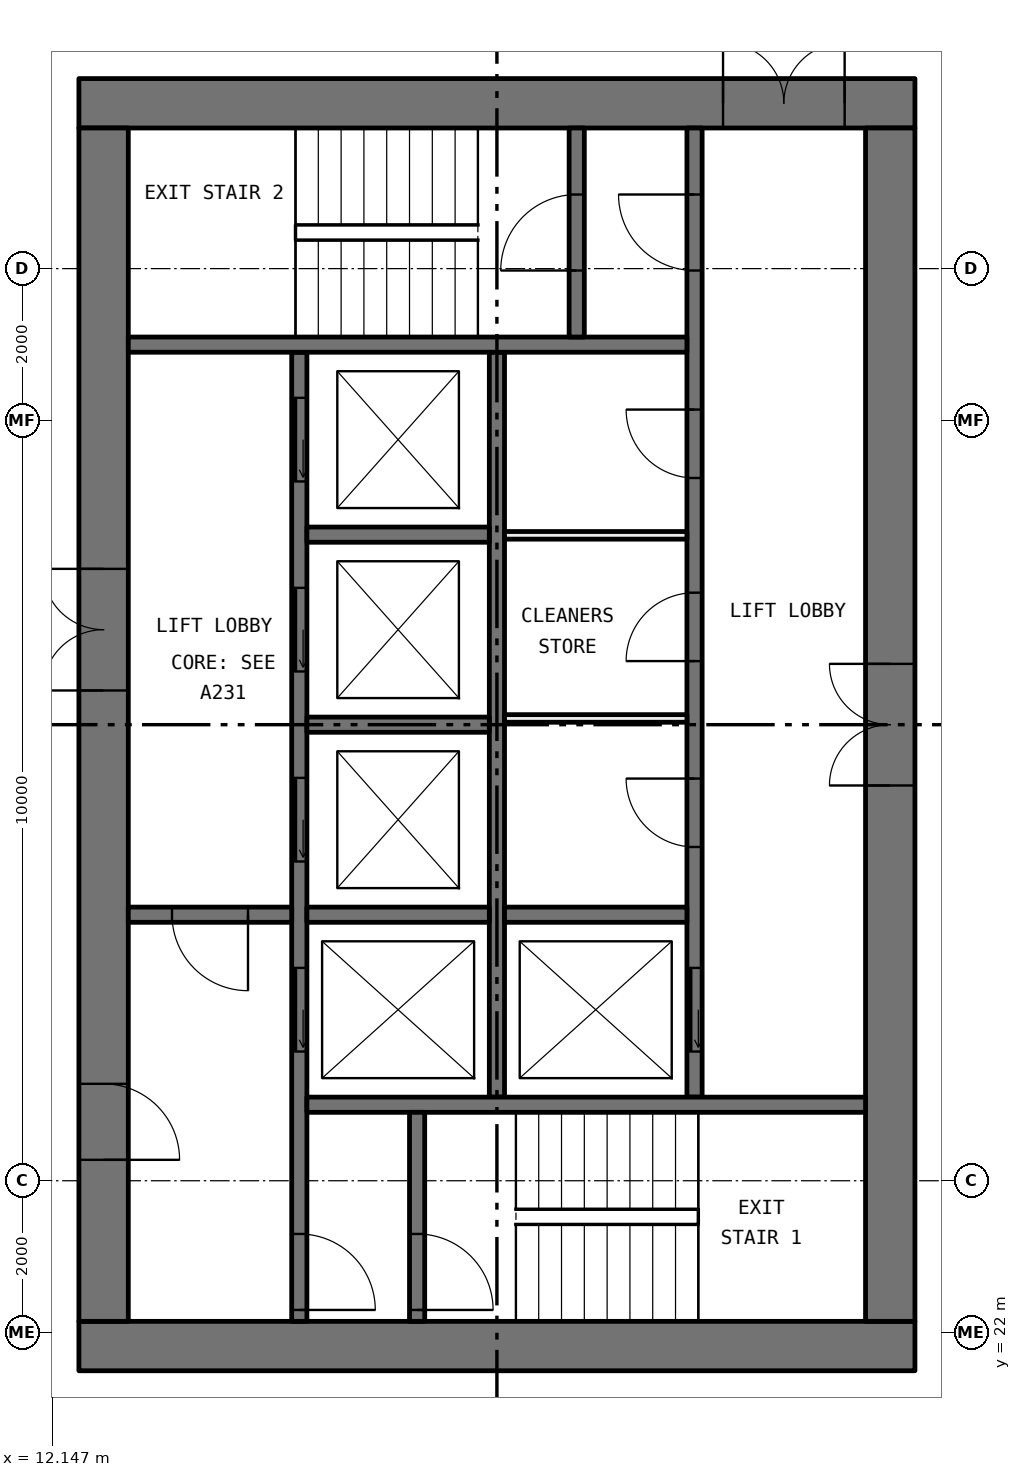
"""IFC4 building model, lengths in metres.
Left out: names, types, materials, properties, quantities, classifications, styles, units other than length and angle.
Written with IfcOpenShell. Run it as: python <this file> out.ifc"""

import sys

from ifc_helpers import new_model, si_unit, direction, frame, frame_2d, origin, place, context, subcontext, project, spatial, rectangle, extrude, element, fill, save


model = new_model("IFC4")
c1 = context("Model", 3, precision=1e-05, world=origin(), true_north=direction((0.0, 1.0)))
c2 = subcontext(c1, "Body", "Model", "MODEL_VIEW")
j1 = project(units=[si_unit("LENGTHUNIT", "METRE"), si_unit("PLANEANGLEUNIT", "RADIAN")], contexts=[c1])
p1 = place(None, origin())
s1 = spatial("IfcSite", under=j1, at=p1, CompositionType="ELEMENT")
p2 = place(p1, origin())
s2 = spatial("IfcBuilding", under=s1, at=p2, CompositionType="ELEMENT")
p3 = place(p2, frame((0.0, 0.0, 117.3)))
s3 = spatial("IfcBuildingStorey", under=s2, at=p3, CompositionType="ELEMENT", Elevation=117.3)
p4 = place(p3, frame((12.5, 21.825, 0.0), z_axis=(0.0, 0.0, 1.0), x_axis=(1.0, 0.0, 0.0)))
e1 = element("IfcWall", 1, at=p4, inside=s3, PredefinedType="SHEAR", context=c2, shape_type="SweptSolid", body=[
    extrude(rectangle(XDim=11.0, YDim=0.65, at=frame_2d((5.5, 0.0))), origin(), (0.0, 0.0, 1.0), 3.05),
])
p5 = place(p3, frame((12.5, 38.175, 0.0), z_axis=(0.0, 0.0, 1.0), x_axis=(1.0, 0.0, 0.0)))
e2 = element("IfcWall", 2, at=p5, inside=s3, PredefinedType="SHEAR", context=c2, shape_type="SweptSolid", body=[
    extrude(rectangle(XDim=11.0, YDim=0.65, at=frame_2d((5.5, 0.0))), origin(), (0.0, 0.0, 1.0), 3.05),
])
p6 = place(p5, frame((8.475, 0.0, 0.0)))
e3 = element("IfcOpeningElement", 3, at=p6, cuts=e2, PredefinedType="OPENING", context=c2, shape_type="SweptSolid", body=[
    extrude(rectangle(XDim=1.6, YDim=2.1, at=frame_2d((0.8, 1.05))), frame((0.0, 0.335, 0.0), z_axis=(0.0, -1.0, 0.0), x_axis=(1.0, 0.0, 0.0)), (0.0, 0.0, 1.0), 0.67),
])
p7 = place(p3, frame((12.825, 22.15, 0.0), z_axis=(0.0, 0.0, 1.0), x_axis=(0.0, 1.0, 0.0)))
e4 = element("IfcWall", 4, at=p7, inside=s3, PredefinedType="SHEAR", context=c2, shape_type="SweptSolid", body=[
    extrude(rectangle(XDim=15.7, YDim=0.65, at=frame_2d((7.85, 0.0))), origin(), (0.0, 0.0, 1.0), 3.05),
])
p8 = place(p7, frame((8.3, 0.0, 0.0)))
e5 = element("IfcOpeningElement", 5, at=p8, cuts=e4, PredefinedType="OPENING", context=c2, shape_type="SweptSolid", body=[
    extrude(rectangle(XDim=1.6, YDim=2.1, at=frame_2d((0.8, 1.05))), frame((0.0, 0.335, 0.0), z_axis=(0.0, -1.0, 0.0), x_axis=(1.0, 0.0, 0.0)), (0.0, 0.0, 1.0), 0.67),
])
p9 = place(p7, frame((2.125, 0.0, 0.0)))
e6 = element("IfcOpeningElement", 6, at=p9, cuts=e4, PredefinedType="OPENING", context=c2, shape_type="SweptSolid", body=[
    extrude(rectangle(XDim=1.0, YDim=2.1, at=frame_2d((0.5, 1.05))), frame((0.0, 0.335, 0.0), z_axis=(0.0, -1.0, 0.0), x_axis=(1.0, 0.0, 0.0)), (0.0, 0.0, 1.0), 0.67),
])
p10 = place(p3, frame((23.175, 22.15, 0.0), z_axis=(0.0, 0.0, 1.0), x_axis=(0.0, 1.0, 0.0)))
e7 = element("IfcWall", 7, at=p10, inside=s3, PredefinedType="SHEAR", context=c2, shape_type="SweptSolid", body=[
    extrude(rectangle(XDim=15.7, YDim=0.65, at=frame_2d((7.85, 0.0))), origin(), (0.0, 0.0, 1.0), 3.05),
])
p11 = place(p10, frame((7.05, 0.0, 0.0)))
e8 = element("IfcOpeningElement", 8, at=p11, cuts=e7, PredefinedType="OPENING", context=c2, shape_type="SweptSolid", body=[
    extrude(rectangle(XDim=1.6, YDim=2.1, at=frame_2d((0.8, 1.05))), frame((0.0, 0.335, 0.0), z_axis=(0.0, -1.0, 0.0), x_axis=(1.0, 0.0, 0.0)), (0.0, 0.0, 1.0), 0.67),
])
p12 = place(p3, frame((15.4, 22.15, 0.0), z_axis=(0.0, 0.0, 1.0), x_axis=(0.0, 1.0, 0.0)))
e9 = element("IfcWall", 9, at=p12, inside=s3, PredefinedType="SOLIDWALL", context=c2, shape_type="SweptSolid", body=[
    extrude(rectangle(XDim=12.75, YDim=0.2, at=frame_2d((6.375, 0.0))), origin(), (0.0, 0.0, 1.0), 3.05),
])
p13 = place(p12, frame((3.55, 0.0, 0.0)))
e10 = element("IfcOpeningElement", 10, at=p13, cuts=e9, PredefinedType="OPENING", context=c2, shape_type="SweptSolid", body=[
    extrude(rectangle(XDim=1.1, YDim=2.1, at=frame_2d((0.55, 1.05))), frame((0.0, 0.11, 0.0), z_axis=(0.0, -1.0, 0.0), x_axis=(1.0, 0.0, 0.0)), (0.0, 0.0, 1.0), 0.22),
])
p14 = place(p12, frame((6.05, 0.0, 0.0)))
e11 = element("IfcOpeningElement", 11, at=p14, cuts=e9, PredefinedType="OPENING", context=c2, shape_type="SweptSolid", body=[
    extrude(rectangle(XDim=1.1, YDim=2.1, at=frame_2d((0.55, 1.05))), frame((0.0, 0.11, 0.0), z_axis=(0.0, -1.0, 0.0), x_axis=(1.0, 0.0, 0.0)), (0.0, 0.0, 1.0), 0.22),
])
p15 = place(p12, frame((8.55, 0.0, 0.0)))
e12 = element("IfcOpeningElement", 12, at=p15, cuts=e9, PredefinedType="OPENING", context=c2, shape_type="SweptSolid", body=[
    extrude(rectangle(XDim=1.1, YDim=2.1, at=frame_2d((0.55, 1.05))), frame((0.0, 0.11, 0.0), z_axis=(0.0, -1.0, 0.0), x_axis=(1.0, 0.0, 0.0)), (0.0, 0.0, 1.0), 0.22),
])
p16 = place(p12, frame((11.05, 0.0, 0.0)))
e13 = element("IfcOpeningElement", 13, at=p16, cuts=e9, PredefinedType="OPENING", context=c2, shape_type="SweptSolid", body=[
    extrude(rectangle(XDim=1.1, YDim=2.1, at=frame_2d((0.55, 1.05))), frame((0.0, 0.11, 0.0), z_axis=(0.0, -1.0, 0.0), x_axis=(1.0, 0.0, 0.0)), (0.0, 0.0, 1.0), 0.22),
])
p17 = place(p12, frame((0.15, 0.0, 0.0)))
e14 = element("IfcOpeningElement", 14, at=p17, cuts=e9, PredefinedType="OPENING", context=c2, shape_type="SweptSolid", body=[
    extrude(rectangle(XDim=1.0, YDim=2.1, at=frame_2d((0.5, 1.05))), frame((0.0, 0.11, 0.0), z_axis=(0.0, -1.0, 0.0), x_axis=(1.0, 0.0, 0.0)), (0.0, 0.0, 1.0), 0.22),
])
p18 = place(p3, frame((20.6, 25.1, 0.0), z_axis=(0.0, 0.0, 1.0), x_axis=(0.0, 1.0, 0.0)))
e15 = element("IfcWall", 15, at=p18, inside=s3, PredefinedType="SOLIDWALL", context=c2, shape_type="SweptSolid", body=[
    extrude(rectangle(XDim=12.75, YDim=0.2, at=frame_2d((6.375, 0.0))), origin(), (0.0, 0.0, 1.0), 3.05),
])
p19 = place(p18, frame((0.6, 0.0, 0.0)))
e16 = element("IfcOpeningElement", 16, at=p19, cuts=e15, PredefinedType="OPENING", context=c2, shape_type="SweptSolid", body=[
    extrude(rectangle(XDim=1.1, YDim=2.1, at=frame_2d((0.55, 1.05))), frame((0.0, 0.11, 0.0), z_axis=(0.0, -1.0, 0.0), x_axis=(1.0, 0.0, 0.0)), (0.0, 0.0, 1.0), 0.22),
])
p20 = place(p18, frame((10.875, 0.0, 0.0)))
e17 = element("IfcOpeningElement", 17, at=p20, cuts=e15, PredefinedType="OPENING", context=c2, shape_type="SweptSolid", body=[
    extrude(rectangle(XDim=1.0, YDim=2.1, at=frame_2d((0.5, 1.05))), frame((0.0, 0.11, 0.0), z_axis=(0.0, -1.0, 0.0), x_axis=(1.0, 0.0, 0.0)), (0.0, 0.0, 1.0), 0.22),
])
p21 = place(p18, frame((3.291, 0.0, 0.0)))
e18 = element("IfcOpeningElement", 18, at=p21, cuts=e15, PredefinedType="OPENING", context=c2, shape_type="SweptSolid", body=[
    extrude(rectangle(XDim=0.9, YDim=2.1, at=frame_2d((0.45, 1.05))), frame((0.0, 0.11, 0.0), z_axis=(0.0, -1.0, 0.0), x_axis=(1.0, 0.0, 0.0)), (0.0, 0.0, 1.0), 0.22),
])
p22 = place(p18, frame((5.737, 0.0, 0.0)))
e19 = element("IfcOpeningElement", 19, at=p22, cuts=e15, PredefinedType="OPENING", context=c2, shape_type="SweptSolid", body=[
    extrude(rectangle(XDim=0.9, YDim=2.1, at=frame_2d((0.45, 1.05))), frame((0.0, 0.11, 0.0), z_axis=(0.0, -1.0, 0.0), x_axis=(1.0, 0.0, 0.0)), (0.0, 0.0, 1.0), 0.22),
])
p23 = place(p18, frame((8.146, 0.0, 0.0)))
e20 = element("IfcOpeningElement", 20, at=p23, cuts=e15, PredefinedType="OPENING", context=c2, shape_type="SweptSolid", body=[
    extrude(rectangle(XDim=0.9, YDim=2.1, at=frame_2d((0.45, 1.05))), frame((0.0, 0.11, 0.0), z_axis=(0.0, -1.0, 0.0), x_axis=(1.0, 0.0, 0.0)), (0.0, 0.0, 1.0), 0.22),
])
p24 = place(p3, frame((18.0, 25.1, 0.0), z_axis=(0.0, 0.0, 1.0), x_axis=(0.0, 1.0, 0.0)))
e21 = element("IfcWall", 21, at=p24, inside=s3, PredefinedType="SOLIDWALL", context=c2, shape_type="SweptSolid", body=[
    extrude(rectangle(XDim=9.8, YDim=0.2, at=frame_2d((4.9, 0.0))), origin(), (0.0, 0.0, 1.0), 3.05),
])
for number, where, z_axis, x_axis in (
    (22, (15.5, 25.0, 0.0), (0.0, 0.0, 1.0), (1.0, 0.0, 0.0)),
    (23, (13.15, 35.0, 0.0), (0.0, 0.0, 1.0), (1.0, 0.0, 0.0)),
):
    element("IfcWall", number, at=place(p3, frame(where, z_axis=z_axis, x_axis=x_axis)), inside=s3, PredefinedType="SOLIDWALL", context=c2, shape_type="SweptSolid", body=[
        extrude(rectangle(XDim=7.35, YDim=0.2, at=frame_2d((3.675, 0.0))), origin(), (0.0, 0.0, 1.0), 3.05),
    ])
p25 = place(p3, frame((13.15, 27.5, 0.0), z_axis=(0.0, 0.0, 1.0), x_axis=(1.0, 0.0, 0.0)))
e24 = element("IfcWall", 24, at=p25, inside=s3, PredefinedType="SOLIDWALL", context=c2, shape_type="SweptSolid", body=[
    extrude(rectangle(XDim=2.15, YDim=0.2, at=frame_2d((1.075, 0.0))), origin(), (0.0, 0.0, 1.0), 3.05),
])
p26 = place(p25, frame((0.575, 0.0, 0.0)))
e25 = element("IfcOpeningElement", 25, at=p26, cuts=e24, PredefinedType="OPENING", context=c2, shape_type="SweptSolid", body=[
    extrude(rectangle(XDim=1.0, YDim=2.1, at=frame_2d((0.5, 1.05))), frame((0.0, 0.11, 0.0), z_axis=(0.0, -1.0, 0.0), x_axis=(1.0, 0.0, 0.0)), (0.0, 0.0, 1.0), 0.22),
])
p27 = place(p3, frame((16.95, 22.15, 0.0), z_axis=(0.0, 0.0, 1.0), x_axis=(0.0, 1.0, 0.0)))
e26 = element("IfcWall", 26, at=p27, inside=s3, PredefinedType="SOLIDWALL", context=c2, shape_type="SweptSolid", body=[
    extrude(rectangle(XDim=2.75, YDim=0.2, at=frame_2d((1.375, 0.0))), origin(), (0.0, 0.0, 1.0), 3.05),
])
p28 = place(p27, frame((0.15, 0.0, 0.0)))
e27 = element("IfcOpeningElement", 27, at=p28, cuts=e26, PredefinedType="OPENING", context=c2, shape_type="SweptSolid", body=[
    extrude(rectangle(XDim=1.0, YDim=2.1, at=frame_2d((0.5, 1.05))), frame((0.0, 0.11, 0.0), z_axis=(0.0, -1.0, 0.0), x_axis=(1.0, 0.0, 0.0)), (0.0, 0.0, 1.0), 0.22),
])
p29 = place(p3, frame((19.05, 35.1, 0.0), z_axis=(0.0, 0.0, 1.0), x_axis=(0.0, 1.0, 0.0)))
e28 = element("IfcWall", 28, at=p29, inside=s3, PredefinedType="SOLIDWALL", context=c2, shape_type="SweptSolid", body=[
    extrude(rectangle(XDim=2.75, YDim=0.2, at=frame_2d((1.375, 0.0))), origin(), (0.0, 0.0, 1.0), 3.05),
])
p30 = place(p29, frame((0.875, 0.0, 0.0)))
e29 = element("IfcOpeningElement", 29, at=p30, cuts=e28, PredefinedType="OPENING", context=c2, shape_type="SweptSolid", body=[
    extrude(rectangle(XDim=1.0, YDim=2.1, at=frame_2d((0.5, 1.05))), frame((0.0, 0.11, 0.0), z_axis=(0.0, -1.0, 0.0), x_axis=(1.0, 0.0, 0.0)), (0.0, 0.0, 1.0), 0.22),
])
for number, where, z_axis, x_axis in (
    (30, (15.5, 27.5, 0.0), (0.0, 0.0, 1.0), (1.0, 0.0, 0.0)),
    (31, (15.5, 30.0, 0.0), (0.0, 0.0, 1.0), (1.0, 0.0, 0.0)),
    (32, (15.5, 32.5, 0.0), (0.0, 0.0, 1.0), (1.0, 0.0, 0.0)),
    (33, (18.1, 27.5, 0.0), (0.0, 0.0, 1.0), (1.0, 0.0, 0.0)),
):
    element("IfcWall", number, at=place(p3, frame(where, z_axis=z_axis, x_axis=x_axis)), inside=s3, PredefinedType="SOLIDWALL", context=c2, shape_type="SweptSolid", body=[
        extrude(rectangle(XDim=2.4, YDim=0.2, at=frame_2d((1.2, 0.0))), origin(), (0.0, 0.0, 1.0), 3.05),
    ])
for number, where, z_axis, x_axis in (
    (34, (18.1, 30.082, 0.0), (0.0, 0.0, 1.0), (1.0, 0.0, 0.0)),
    (35, (18.1, 32.491, 0.0), (0.0, 0.0, 1.0), (1.0, 0.0, 0.0)),
):
    element("IfcWall", number, at=place(p3, frame(where, z_axis=z_axis, x_axis=x_axis)), inside=s3, PredefinedType="PARTITIONING", context=c2, shape_type="SweptSolid", body=[
        extrude(rectangle(XDim=2.4, YDim=0.1, at=frame_2d((1.2, 0.0))), origin(), (0.0, 0.0, 1.0), 3.05),
    ])
p31 = place(p19, origin())
e36 = element("IfcDoor", 36, at=p31, inside=s3, OperationType="SLIDING_TO_LEFT", PredefinedType="DOOR", context=c2, shape_type="SweptSolid", body=[
    extrude(rectangle(XDim=1.1, YDim=2.1, at=frame_2d((0.55, 1.05))), frame((0.0, 0.025, 0.0), z_axis=(0.0, -1.0, 0.0), x_axis=(1.0, 0.0, 0.0)), (0.0, 0.0, 1.0), 0.05),
])
fill(e16, e36)
p32 = place(p13, origin())
e37 = element("IfcDoor", 37, at=p32, inside=s3, OperationType="SLIDING_TO_LEFT", PredefinedType="DOOR", context=c2, shape_type="SweptSolid", body=[
    extrude(rectangle(XDim=1.1, YDim=2.1, at=frame_2d((0.55, 1.05))), frame((0.0, 0.025, 0.0), z_axis=(0.0, -1.0, 0.0), x_axis=(1.0, 0.0, 0.0)), (0.0, 0.0, 1.0), 0.05),
])
fill(e10, e37)
p33 = place(p14, origin())
e38 = element("IfcDoor", 38, at=p33, inside=s3, OperationType="SLIDING_TO_LEFT", PredefinedType="DOOR", context=c2, shape_type="SweptSolid", body=[
    extrude(rectangle(XDim=1.1, YDim=2.1, at=frame_2d((0.55, 1.05))), frame((0.0, 0.025, 0.0), z_axis=(0.0, -1.0, 0.0), x_axis=(1.0, 0.0, 0.0)), (0.0, 0.0, 1.0), 0.05),
])
fill(e11, e38)
p34 = place(p15, origin())
e39 = element("IfcDoor", 39, at=p34, inside=s3, OperationType="SLIDING_TO_LEFT", PredefinedType="DOOR", context=c2, shape_type="SweptSolid", body=[
    extrude(rectangle(XDim=1.1, YDim=2.1, at=frame_2d((0.55, 1.05))), frame((0.0, 0.025, 0.0), z_axis=(0.0, -1.0, 0.0), x_axis=(1.0, 0.0, 0.0)), (0.0, 0.0, 1.0), 0.05),
])
fill(e12, e39)
p35 = place(p16, origin())
e40 = element("IfcDoor", 40, at=p35, inside=s3, OperationType="SLIDING_TO_LEFT", PredefinedType="DOOR", context=c2, shape_type="SweptSolid", body=[
    extrude(rectangle(XDim=1.1, YDim=2.1, at=frame_2d((0.55, 1.05))), frame((0.0, 0.025, 0.0), z_axis=(0.0, -1.0, 0.0), x_axis=(1.0, 0.0, 0.0)), (0.0, 0.0, 1.0), 0.05),
])
fill(e13, e40)
p36 = place(p28, frame((1.0, 0.0, 0.0), x_axis=(-1.0, 0.0, 0.0)))
e41 = element("IfcDoor", 41, at=p36, inside=s3, OperationType="SINGLE_SWING_LEFT", PredefinedType="DOOR", context=c2, shape_type="SweptSolid", body=[
    extrude(rectangle(XDim=1.0, YDim=2.1, at=frame_2d((0.5, 1.05))), frame((0.0, 0.025, 0.0), z_axis=(0.0, -1.0, 0.0), x_axis=(1.0, 0.0, 0.0)), (0.0, 0.0, 1.0), 0.05),
])
fill(e27, e41)
p37 = place(p17, frame((1.0, 0.0, 0.0), x_axis=(-1.0, 0.0, 0.0)))
e42 = element("IfcDoor", 42, at=p37, inside=s3, OperationType="SINGLE_SWING_LEFT", PredefinedType="DOOR", context=c2, shape_type="SweptSolid", body=[
    extrude(rectangle(XDim=1.0, YDim=2.1, at=frame_2d((0.5, 1.05))), frame((0.0, 0.025, 0.0), z_axis=(0.0, -1.0, 0.0), x_axis=(1.0, 0.0, 0.0)), (0.0, 0.0, 1.0), 0.05),
])
fill(e14, e42)
p38 = place(p20, origin())
e43 = element("IfcDoor", 43, at=p38, inside=s3, OperationType="SINGLE_SWING_LEFT", PredefinedType="DOOR", context=c2, shape_type="SweptSolid", body=[
    extrude(rectangle(XDim=1.0, YDim=2.1, at=frame_2d((0.5, 1.05))), frame((0.0, 0.025, 0.0), z_axis=(0.0, -1.0, 0.0), x_axis=(1.0, 0.0, 0.0)), (0.0, 0.0, 1.0), 0.05),
])
fill(e17, e43)
p39 = place(p30, origin())
e44 = element("IfcDoor", 44, at=p39, inside=s3, OperationType="SINGLE_SWING_RIGHT", PredefinedType="DOOR", context=c2, shape_type="SweptSolid", body=[
    extrude(rectangle(XDim=1.0, YDim=2.1, at=frame_2d((0.5, 1.05))), frame((0.0, 0.025, 0.0), z_axis=(0.0, -1.0, 0.0), x_axis=(1.0, 0.0, 0.0)), (0.0, 0.0, 1.0), 0.05),
])
fill(e29, e44)
p40 = place(p26, frame((1.0, 0.0, 0.0), x_axis=(-1.0, 0.0, 0.0)))
e45 = element("IfcDoor", 45, at=p40, inside=s3, OperationType="SINGLE_SWING_RIGHT", PredefinedType="DOOR", context=c2, shape_type="SweptSolid", body=[
    extrude(rectangle(XDim=1.0, YDim=2.1, at=frame_2d((0.5, 1.05))), frame((0.0, 0.025, 0.0), z_axis=(0.0, -1.0, 0.0), x_axis=(1.0, 0.0, 0.0)), (0.0, 0.0, 1.0), 0.05),
])
fill(e25, e45)
p41 = place(p8, origin())
e46 = element("IfcDoor", 46, at=p41, inside=s3, OperationType="DOUBLE_DOOR_SINGLE_SWING", PredefinedType="DOOR", context=c2, shape_type="SweptSolid", body=[
    extrude(rectangle(XDim=1.6, YDim=2.1, at=frame_2d((0.8, 1.05))), frame((0.0, 0.025, 0.0), z_axis=(0.0, -1.0, 0.0), x_axis=(1.0, 0.0, 0.0)), (0.0, 0.0, 1.0), 0.05),
])
fill(e5, e46)
p42 = place(p9, frame((1.0, 0.0, 0.0), x_axis=(-1.0, 0.0, 0.0)))
e47 = element("IfcDoor", 47, at=p42, inside=s3, OperationType="SINGLE_SWING_LEFT", PredefinedType="DOOR", context=c2, shape_type="SweptSolid", body=[
    extrude(rectangle(XDim=1.0, YDim=2.1, at=frame_2d((0.5, 1.05))), frame((0.0, 0.025, 0.0), z_axis=(0.0, -1.0, 0.0), x_axis=(1.0, 0.0, 0.0)), (0.0, 0.0, 1.0), 0.05),
])
fill(e6, e47)
p43 = place(p6, origin())
e48 = element("IfcDoor", 48, at=p43, inside=s3, OperationType="DOUBLE_DOOR_SINGLE_SWING", PredefinedType="DOOR", context=c2, shape_type="SweptSolid", body=[
    extrude(rectangle(XDim=1.6, YDim=2.1, at=frame_2d((0.8, 1.05))), frame((0.0, 0.025, 0.0), z_axis=(0.0, -1.0, 0.0), x_axis=(1.0, 0.0, 0.0)), (0.0, 0.0, 1.0), 0.05),
])
fill(e3, e48)
p44 = place(p11, origin())
e49 = element("IfcDoor", 49, at=p44, inside=s3, OperationType="DOUBLE_DOOR_SINGLE_SWING", PredefinedType="DOOR", context=c2, shape_type="SweptSolid", body=[
    extrude(rectangle(XDim=1.6, YDim=2.1, at=frame_2d((0.8, 1.05))), frame((0.0, 0.025, 0.0), z_axis=(0.0, -1.0, 0.0), x_axis=(1.0, 0.0, 0.0)), (0.0, 0.0, 1.0), 0.05),
])
fill(e8, e49)
p45 = place(p21, origin())
e50 = element("IfcDoor", 50, at=p45, inside=s3, OperationType="SINGLE_SWING_LEFT", PredefinedType="DOOR", context=c2, shape_type="SweptSolid", body=[
    extrude(rectangle(XDim=0.9, YDim=2.1, at=frame_2d((0.45, 1.05))), frame((0.0, 0.025, 0.0), z_axis=(0.0, -1.0, 0.0), x_axis=(1.0, 0.0, 0.0)), (0.0, 0.0, 1.0), 0.05),
])
fill(e18, e50)
p46 = place(p22, origin())
e51 = element("IfcDoor", 51, at=p46, inside=s3, OperationType="SINGLE_SWING_RIGHT", PredefinedType="DOOR", context=c2, shape_type="SweptSolid", body=[
    extrude(rectangle(XDim=0.9, YDim=2.1, at=frame_2d((0.45, 1.05))), frame((0.0, 0.025, 0.0), z_axis=(0.0, -1.0, 0.0), x_axis=(1.0, 0.0, 0.0)), (0.0, 0.0, 1.0), 0.05),
])
fill(e19, e51)
p47 = place(p23, origin())
e52 = element("IfcDoor", 52, at=p47, inside=s3, OperationType="SINGLE_SWING_LEFT", PredefinedType="DOOR", context=c2, shape_type="SweptSolid", body=[
    extrude(rectangle(XDim=0.9, YDim=2.1, at=frame_2d((0.45, 1.05))), frame((0.0, 0.025, 0.0), z_axis=(0.0, -1.0, 0.0), x_axis=(1.0, 0.0, 0.0)), (0.0, 0.0, 1.0), 0.05),
])
fill(e20, e52)
save(model, sys.argv[1])
